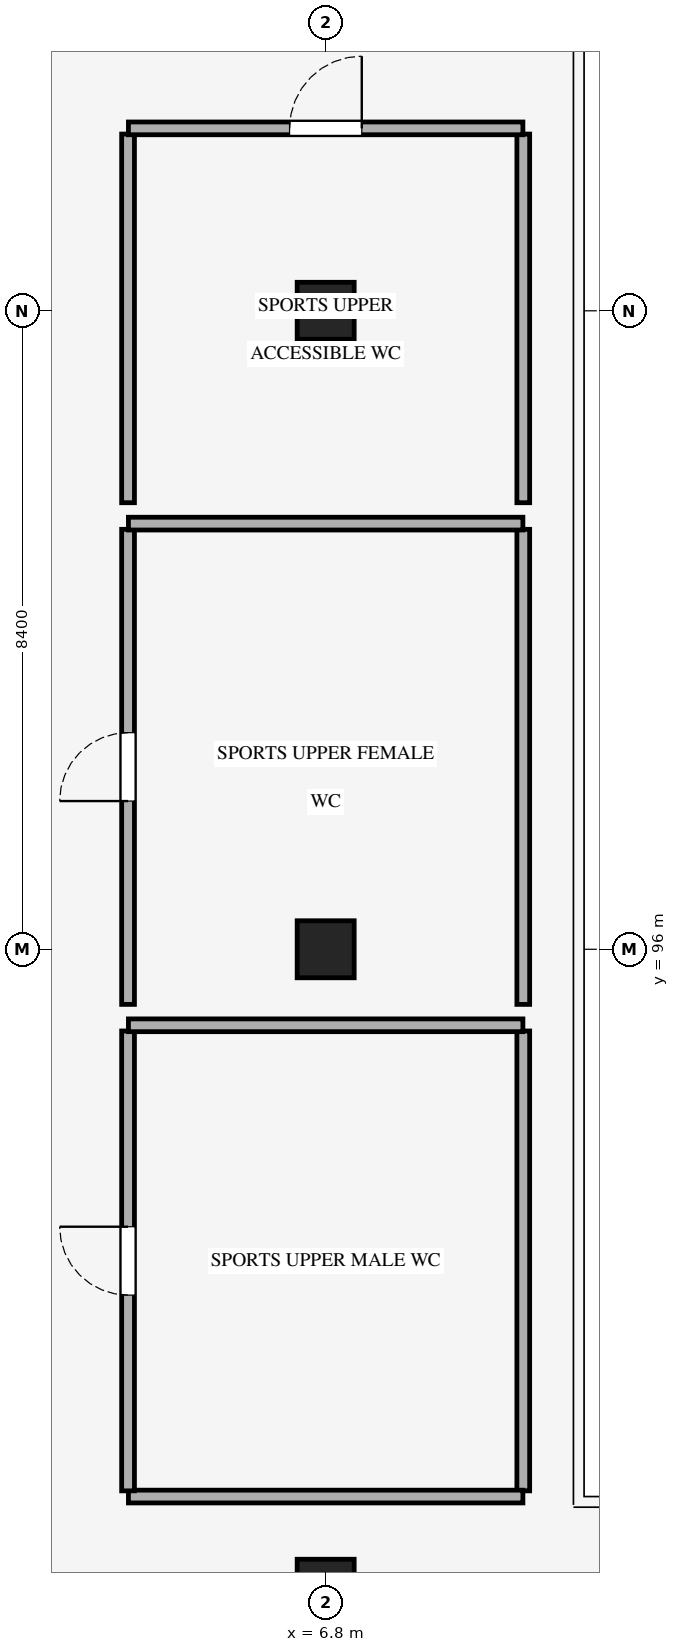
"""IFC4 building model, lengths in metres.
Left out: names, types, materials, properties, quantities, classifications, styles, units other than length and angle.
Written with IfcOpenShell. Run it as: python <this file> out.ifc"""

import sys

from ifc_helpers import new_model, si_unit, direction, frame, frame_2d, origin, origin_2d, place, context, subcontext, project, spatial, rectangle, extrude, element, fill, save


model = new_model("IFC4")
c1 = context("Model", 3, precision=1e-05, world=origin(), true_north=direction((0.0, 1.0)))
c2 = subcontext(c1, "Body", "Model", "MODEL_VIEW")
j1 = project(units=[si_unit("LENGTHUNIT", "METRE"), si_unit("PLANEANGLEUNIT", "RADIAN")], contexts=[c1])
p1 = place(None, origin())
s1 = spatial("IfcSite", under=j1, at=p1, CompositionType="ELEMENT")
p2 = place(p1, origin())
s2 = spatial("IfcBuilding", under=s1, at=p2, CompositionType="ELEMENT")
p3 = place(p2, frame((0.0, 0.0, 4.8)))
s3 = spatial("IfcBuildingStorey", under=s2, at=p3, CompositionType="ELEMENT", Elevation=4.8)
for number, where, z_axis, x_axis in (
    (1, (6.8, 87.6, 0.0), (0.0, 0.0, 1.0), (1.0, 0.0, 0.0)),
    (2, (6.8, 96.0, 0.0), (0.0, 0.0, 1.0), (1.0, 0.0, 0.0)),
    (3, (6.8, 104.4, 0.0), (0.0, 0.0, 1.0), (1.0, 0.0, 0.0)),
):
    element("IfcColumn", number, at=place(p3, frame(where, z_axis=z_axis, x_axis=x_axis)), inside=s3, PredefinedType="COLUMN", context=c2, shape_type="SweptSolid", body=[
        extrude(rectangle(XDim=0.75, YDim=0.75, at=origin_2d()), origin(), (0.0, 0.0, 1.0), 4.8),
    ])
p4 = place(p3, frame((9.4, 94.925, 0.0), z_axis=(0.0, 0.0, 1.0), x_axis=(0.0, -1.0, 0.0)))
e4 = element("IfcWall", 4, at=p4, inside=s3, PredefinedType="STANDARD", context=c2, shape_type="SweptSolid", body=[
    extrude(rectangle(XDim=6.05, YDim=0.168, at=frame_2d((3.025, 0.0))), origin(), (0.0, 0.0, 1.0), 4.54),
])
p5 = place(p3, frame((9.395, 88.8, 0.0), z_axis=(0.0, 0.0, 1.0), x_axis=(-1.0, 0.0, 0.0)))
e5 = element("IfcWall", 5, at=p5, inside=s3, PredefinedType="STANDARD", context=c2, shape_type="SweptSolid", body=[
    extrude(rectangle(XDim=5.19, YDim=0.168, at=frame_2d((2.595, 0.0))), origin(), (0.0, 0.0, 1.0), 3.525),
])
p6 = place(p3, frame((4.2, 88.875, 0.0), z_axis=(0.0, 0.0, 1.0), x_axis=(0.0, 1.0, 0.0)))
e6 = element("IfcWall", 6, at=p6, inside=s3, PredefinedType="STANDARD", context=c2, shape_type="SweptSolid", body=[
    extrude(rectangle(XDim=6.05, YDim=0.168, at=frame_2d((3.025, 0.0))), origin(), (0.0, 0.0, 1.0), 4.54),
])
p7 = place(p6, frame((2.575, 0.0, 0.0)))
e7 = element("IfcOpeningElement", 7, at=p7, cuts=e6, PredefinedType="OPENING", context=c2, shape_type="SweptSolid", body=[
    extrude(rectangle(XDim=0.9, YDim=2.1, at=frame_2d((0.45, 1.05))), frame((0.0, 0.094, 0.0), z_axis=(0.0, -1.0, 0.0), x_axis=(1.0, 0.0, 0.0)), (0.0, 0.0, 1.0), 0.188),
])
p8 = place(p3, frame((4.205, 95.0, 0.0), z_axis=(0.0, 0.0, 1.0), x_axis=(1.0, 0.0, 0.0)))
e8 = element("IfcWall", 8, at=p8, inside=s3, PredefinedType="STANDARD", context=c2, shape_type="SweptSolid", body=[
    extrude(rectangle(XDim=5.19, YDim=0.168, at=frame_2d((2.595, 0.0))), origin(), (0.0, 0.0, 1.0), 3.525),
])
p9 = place(p3, frame((9.4, 101.525, 0.0), z_axis=(0.0, 0.0, 1.0), x_axis=(0.0, -1.0, 0.0)))
e9 = element("IfcWall", 9, at=p9, inside=s3, PredefinedType="STANDARD", context=c2, shape_type="SweptSolid", body=[
    extrude(rectangle(XDim=6.25, YDim=0.168, at=frame_2d((3.125, 0.0))), origin(), (0.0, 0.0, 1.0), 4.54),
])
p10 = place(p3, frame((4.2, 95.275, 0.0), z_axis=(0.0, 0.0, 1.0), x_axis=(0.0, 1.0, 0.0)))
e10 = element("IfcWall", 10, at=p10, inside=s3, PredefinedType="STANDARD", context=c2, shape_type="SweptSolid", body=[
    extrude(rectangle(XDim=6.25, YDim=0.168, at=frame_2d((3.125, 0.0))), origin(), (0.0, 0.0, 1.0), 4.54),
])
p11 = place(p10, frame((2.675, 0.0, 0.0)))
e11 = element("IfcOpeningElement", 11, at=p11, cuts=e10, PredefinedType="OPENING", context=c2, shape_type="SweptSolid", body=[
    extrude(rectangle(XDim=0.9, YDim=2.1, at=frame_2d((0.45, 1.05))), frame((0.0, 0.094, 0.0), z_axis=(0.0, -1.0, 0.0), x_axis=(1.0, 0.0, 0.0)), (0.0, 0.0, 1.0), 0.188),
])
p12 = place(p3, frame((4.205, 101.6, 0.0), z_axis=(0.0, 0.0, 1.0), x_axis=(1.0, 0.0, 0.0)))
e12 = element("IfcWall", 12, at=p12, inside=s3, PredefinedType="STANDARD", context=c2, shape_type="SweptSolid", body=[
    extrude(rectangle(XDim=5.19, YDim=0.168, at=frame_2d((2.595, 0.0))), origin(), (0.0, 0.0, 1.0), 3.525),
])
for number, where, z_axis, x_axis in (
    (13, (9.4, 106.725, 0.0), (0.0, 0.0, 1.0), (0.0, -1.0, 0.0)),
    (14, (4.2, 101.875, 0.0), (0.0, 0.0, 1.0), (0.0, 1.0, 0.0)),
):
    element("IfcWall", number, at=place(p3, frame(where, z_axis=z_axis, x_axis=x_axis)), inside=s3, PredefinedType="STANDARD", context=c2, shape_type="SweptSolid", body=[
        extrude(rectangle(XDim=4.85, YDim=0.168, at=frame_2d((2.425, 0.0))), origin(), (0.0, 0.0, 1.0), 4.54),
    ])
p13 = place(p3, frame((4.205, 106.8, 0.0), z_axis=(0.0, 0.0, 1.0), x_axis=(1.0, 0.0, 0.0)))
e15 = element("IfcWall", 15, at=p13, inside=s3, PredefinedType="STANDARD", context=c2, shape_type="SweptSolid", body=[
    extrude(rectangle(XDim=5.19, YDim=0.168, at=frame_2d((2.595, 0.0))), origin(), (0.0, 0.0, 1.0), 3.525),
])
p14 = place(p13, frame((2.12, 0.0, 0.0)))
e16 = element("IfcOpeningElement", 16, at=p14, cuts=e15, PredefinedType="OPENING", context=c2, shape_type="SweptSolid", body=[
    extrude(rectangle(XDim=0.95, YDim=2.1, at=frame_2d((0.475, 1.05))), frame((0.0, 0.094, 0.0), z_axis=(0.0, -1.0, 0.0), x_axis=(1.0, 0.0, 0.0)), (0.0, 0.0, 1.0), 0.188),
])
p15 = place(p7, origin())
e17 = element("IfcDoor", 17, at=p15, inside=s3, OperationType="SINGLE_SWING_RIGHT", PredefinedType="DOOR", context=c2, shape_type="SweptSolid", body=[
    extrude(rectangle(XDim=0.9, YDim=2.1, at=frame_2d((0.45, 1.05))), frame((0.0, 0.025, 0.0), z_axis=(0.0, -1.0, 0.0), x_axis=(1.0, 0.0, 0.0)), (0.0, 0.0, 1.0), 0.05),
])
fill(e7, e17)
p16 = place(p11, origin())
e18 = element("IfcDoor", 18, at=p16, inside=s3, OperationType="SINGLE_SWING_LEFT", PredefinedType="DOOR", context=c2, shape_type="SweptSolid", body=[
    extrude(rectangle(XDim=0.9, YDim=2.1, at=frame_2d((0.45, 1.05))), frame((0.0, 0.025, 0.0), z_axis=(0.0, -1.0, 0.0), x_axis=(1.0, 0.0, 0.0)), (0.0, 0.0, 1.0), 0.05),
])
fill(e11, e18)
p17 = place(p14, origin())
e19 = element("IfcDoor", 19, at=p17, inside=s3, OperationType="SINGLE_SWING_RIGHT", PredefinedType="DOOR", context=c2, shape_type="SweptSolid", body=[
    extrude(rectangle(XDim=0.95, YDim=2.1, at=frame_2d((0.475, 1.05))), frame((0.0, 0.025, 0.0), z_axis=(0.0, -1.0, 0.0), x_axis=(1.0, 0.0, 0.0)), (0.0, 0.0, 1.0), 0.05),
])
fill(e16, e19)
save(model, sys.argv[1])
